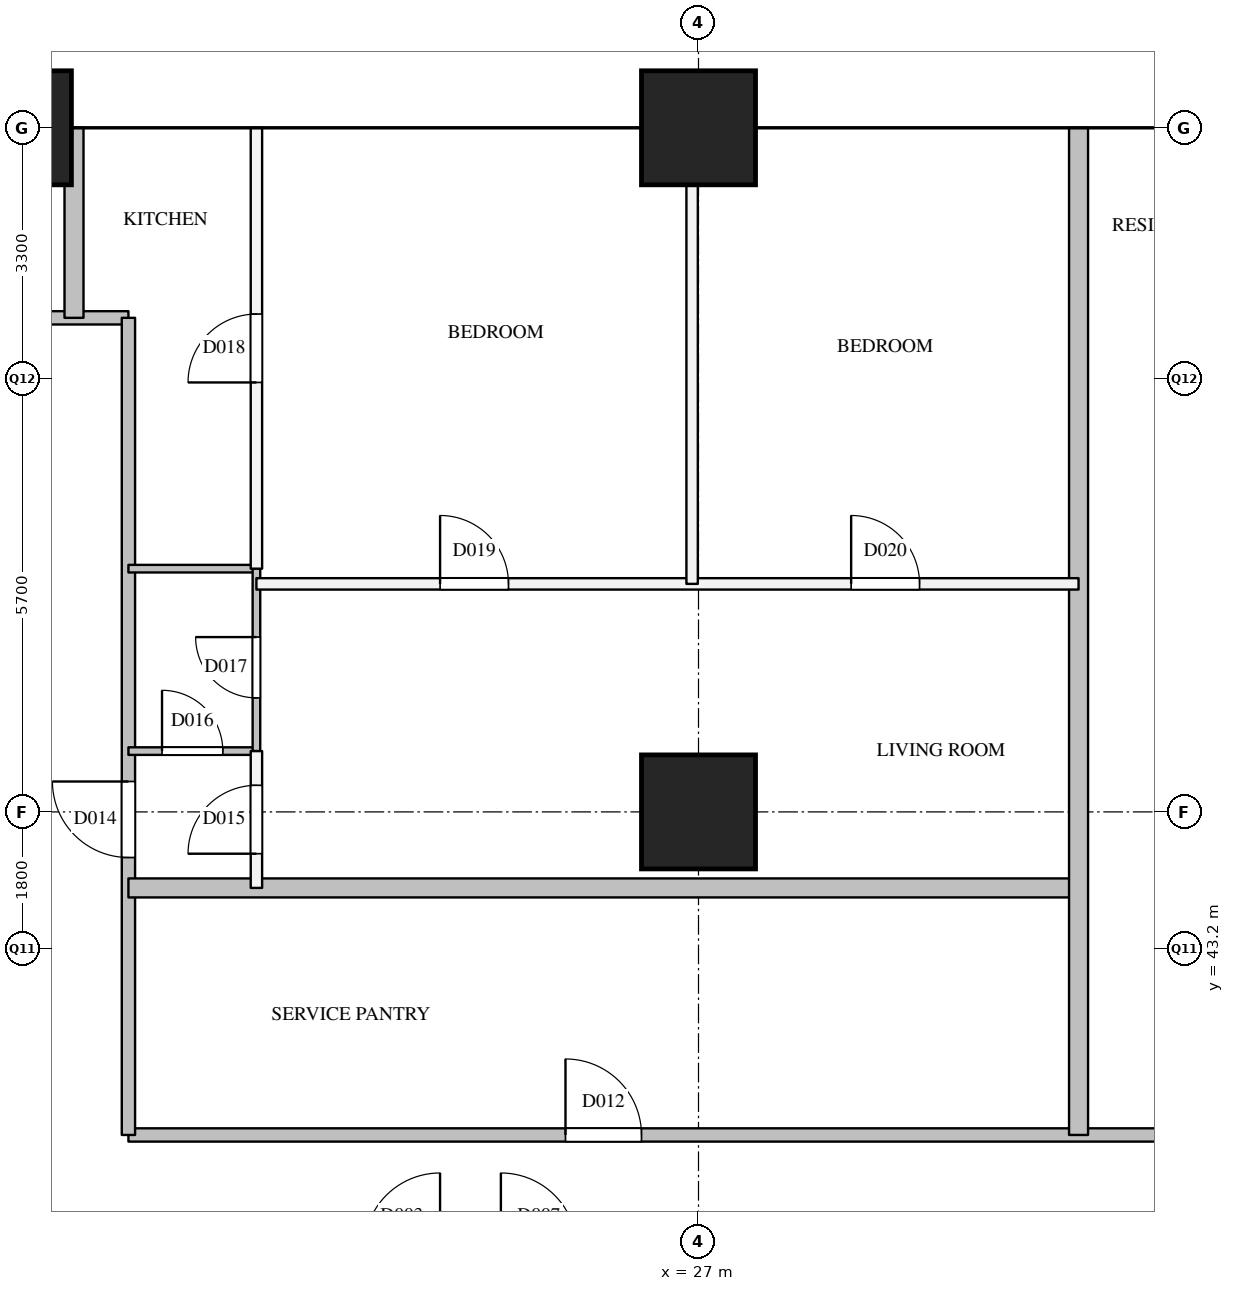
"""IFC4 building model, lengths in metres.
Left out: names, types, materials, properties, quantities, classifications, styles, units other than length and angle.
Written with IfcOpenShell. Run it as: python <this file> out.ifc"""

import sys

from ifc_helpers import new_model, si_unit, direction, frame, frame_2d, origin, origin_2d, place, context, subcontext, project, spatial, rectangle, extrude, element, fill, save


model = new_model("IFC4")
c1 = context("Model", 3, precision=1e-05, world=origin(), true_north=direction((0.0, 1.0)))
c2 = subcontext(c1, "Body", "Model", "MODEL_VIEW")
j1 = project(units=[si_unit("LENGTHUNIT", "METRE"), si_unit("PLANEANGLEUNIT", "RADIAN")], contexts=[c1])
p1 = place(None, origin())
s1 = spatial("IfcSite", under=j1, at=p1, CompositionType="ELEMENT")
p2 = place(p1, origin())
s2 = spatial("IfcBuilding", under=s1, at=p2, CompositionType="ELEMENT")
p3 = place(p2, frame((0.0, 0.0, 173.9)))
s3 = spatial("IfcBuildingStorey", under=s2, at=p3, CompositionType="ELEMENT", Elevation=173.9)
for number, where, z_axis, x_axis in (
    (1, (18.0, 54.0, 0.0), (0.0, 0.0, 1.0), (1.0, 0.0, 0.0)),
    (2, (27.0, 45.0, 0.0), (0.0, 0.0, 1.0), (1.0, 0.0, 0.0)),
    (3, (27.0, 54.0, 0.0), (0.0, 0.0, 1.0), (1.0, 0.0, 0.0)),
):
    element("IfcColumn", number, at=place(p3, frame(where, z_axis=z_axis, x_axis=x_axis)), inside=s3, PredefinedType="COLUMN", context=c2, shape_type="SweptSolid", body=[
        extrude(rectangle(XDim=1.5, YDim=1.5, at=origin_2d()), origin(), (0.0, 0.0, 1.0), 3.9),
    ])
p4 = place(p3, frame((19.5, 40.75, 0.0), z_axis=(0.0, 0.0, 1.0), x_axis=(1.0, 0.0, 0.0)))
e4 = element("IfcWall", 4, at=p4, inside=s3, PredefinedType="PARTITIONING", context=c2, shape_type="SweptSolid", body=[
    extrude(rectangle(XDim=15.0, YDim=0.175, at=frame_2d((7.5, 0.0))), origin(), (0.0, 0.0, 1.0), 2.6),
])
p5 = place(p4, frame((5.75, 0.0, 0.0)))
e5 = element("IfcOpeningElement", 5, at=p5, cuts=e4, PredefinedType="OPENING", context=c2, shape_type="SweptSolid", body=[
    extrude(rectangle(XDim=1.0, YDim=2.1, at=frame_2d((0.5, 1.05))), frame((0.0, 0.097, 0.0), z_axis=(0.0, -1.0, 0.0), x_axis=(1.0, 0.0, 0.0)), (0.0, 0.0, 1.0), 0.195),
])
p6 = place(p3, frame((4.1, 51.5, 0.0), z_axis=(0.0, 0.0, 1.0), x_axis=(1.0, 0.0, 0.0)))
e6 = element("IfcWall", 6, at=p6, inside=s3, PredefinedType="PARTITIONING", context=c2, shape_type="SweptSolid", body=[
    extrude(rectangle(XDim=15.4, YDim=0.175, at=frame_2d((7.7, 0.0))), origin(), (0.0, 0.0, 1.0), 3.6),
])
p7 = place(p6, frame((8.212, 0.0, 0.0)))
e7 = element("IfcOpeningElement", 7, at=p7, cuts=e6, PredefinedType="OPENING", context=c2, shape_type="SweptSolid", body=[
    extrude(rectangle(XDim=1.0, YDim=2.1, at=frame_2d((0.5, 1.05))), frame((0.0, 0.097, 0.0), z_axis=(0.0, -1.0, 0.0), x_axis=(1.0, 0.0, 0.0)), (0.0, 0.0, 1.0), 0.195),
])
p8 = place(p3, frame((19.5, 40.75, 0.0), z_axis=(0.0, 0.0, 1.0), x_axis=(0.0, 1.0, 0.0)))
e8 = element("IfcWall", 8, at=p8, inside=s3, PredefinedType="PARTITIONING", context=c2, shape_type="SweptSolid", body=[
    extrude(rectangle(XDim=10.75, YDim=0.175, at=frame_2d((5.375, 0.0))), origin(), (0.0, 0.0, 1.0), 3.6),
])
p9 = place(p8, frame((3.65, 0.0, 0.0)))
e9 = element("IfcOpeningElement", 9, at=p9, cuts=e8, PredefinedType="OPENING", context=c2, shape_type="SweptSolid", body=[
    extrude(rectangle(XDim=1.0, YDim=2.1, at=frame_2d((0.5, 1.05))), frame((0.0, 0.097, 0.0), z_axis=(0.0, -1.0, 0.0), x_axis=(1.0, 0.0, 0.0)), (0.0, 0.0, 1.0), 0.195),
])
p10 = place(p3, frame((21.184, 48.0, 0.0), z_axis=(0.0, 0.0, 1.0), x_axis=(1.0, 0.0, 0.0)))
e10 = element("IfcWall", 10, at=p10, inside=s3, PredefinedType="PARTITIONING", context=c2, shape_type="SweptSolid", body=[
    extrude(rectangle(XDim=10.816, YDim=0.15, at=frame_2d((5.408, 0.0))), origin(), (0.0, 0.0, 1.0), 2.6),
])
p11 = place(p10, frame((2.416, 0.0, 0.0)))
e11 = element("IfcOpeningElement", 11, at=p11, cuts=e10, PredefinedType="OPENING", context=c2, shape_type="SweptSolid", body=[
    extrude(rectangle(XDim=0.9, YDim=2.1, at=frame_2d((0.45, 1.05))), frame((0.0, 0.085, 0.0), z_axis=(0.0, -1.0, 0.0), x_axis=(1.0, 0.0, 0.0)), (0.0, 0.0, 1.0), 0.17),
])
p12 = place(p10, frame((7.824, 0.0, 0.0)))
e12 = element("IfcOpeningElement", 12, at=p12, cuts=e10, PredefinedType="OPENING", context=c2, shape_type="SweptSolid", body=[
    extrude(rectangle(XDim=0.9, YDim=2.1, at=frame_2d((0.45, 1.05))), frame((0.0, 0.085, 0.0), z_axis=(0.0, -1.0, 0.0), x_axis=(1.0, 0.0, 0.0)), (0.0, 0.0, 1.0), 0.17),
])
p13 = place(p3, frame((21.184, 44.0, 0.0), z_axis=(0.0, 0.0, 1.0), x_axis=(0.0, 1.0, 0.0)))
e13 = element("IfcWall", 13, at=p13, inside=s3, PredefinedType="PARTITIONING", context=c2, shape_type="SweptSolid", body=[
    extrude(rectangle(XDim=1.8, YDim=0.15, at=frame_2d((0.9, 0.0))), origin(), (0.0, 0.0, 1.0), 3.6),
])
p14 = place(p13, frame((0.45, 0.0, 0.0)))
e14 = element("IfcOpeningElement", 14, at=p14, cuts=e13, PredefinedType="OPENING", context=c2, shape_type="SweptSolid", body=[
    extrude(rectangle(XDim=0.9, YDim=2.1, at=frame_2d((0.45, 1.05))), frame((0.0, 0.085, 0.0), z_axis=(0.0, -1.0, 0.0), x_axis=(1.0, 0.0, 0.0)), (0.0, 0.0, 1.0), 0.17),
])
p15 = place(p3, frame((21.184, 48.2, 0.0), z_axis=(0.0, 0.0, 1.0), x_axis=(0.0, 1.0, 0.0)))
e15 = element("IfcWall", 15, at=p15, inside=s3, PredefinedType="PARTITIONING", context=c2, shape_type="SweptSolid", body=[
    extrude(rectangle(XDim=5.8, YDim=0.15, at=frame_2d((2.9, 0.0))), origin(), (0.0, 0.0, 1.0), 2.6),
])
p16 = place(p15, frame((2.45, 0.0, 0.0)))
e16 = element("IfcOpeningElement", 16, at=p16, cuts=e15, PredefinedType="OPENING", context=c2, shape_type="SweptSolid", body=[
    extrude(rectangle(XDim=0.9, YDim=2.1, at=frame_2d((0.45, 1.05))), frame((0.0, 0.085, 0.0), z_axis=(0.0, -1.0, 0.0), x_axis=(1.0, 0.0, 0.0)), (0.0, 0.0, 1.0), 0.17),
])
p17 = place(p3, frame((26.916, 48.0, 0.0), z_axis=(0.0, 0.0, 1.0), x_axis=(0.0, 1.0, 0.0)))
e17 = element("IfcWall", 17, at=p17, inside=s3, PredefinedType="PARTITIONING", context=c2, shape_type="SweptSolid", body=[
    extrude(rectangle(XDim=6.0, YDim=0.15, at=frame_2d((3.0, 0.0))), origin(), (0.0, 0.0, 1.0), 2.6),
])
p18 = place(p3, frame((19.5, 44.0, 0.0), z_axis=(0.0, 0.0, 1.0), x_axis=(1.0, 0.0, 0.0)))
e18 = element("IfcWall", 18, at=p18, inside=s3, PredefinedType="PARTITIONING", context=c2, shape_type="SweptSolid", body=[
    extrude(rectangle(XDim=12.5, YDim=0.25, at=frame_2d((6.25, 0.0))), origin(), (0.0, 0.0, 1.0), 2.6),
])
p19 = place(p3, frame((18.784, 51.5, 0.0), z_axis=(0.0, 0.0, 1.0), x_axis=(0.0, 1.0, 0.0)))
e19 = element("IfcWall", 19, at=p19, inside=s3, PredefinedType="PARTITIONING", context=c2, shape_type="SweptSolid", body=[
    extrude(rectangle(XDim=2.5, YDim=0.25, at=frame_2d((1.25, 0.0))), origin(), (0.0, 0.0, 1.0), 2.6),
])
p20 = place(p3, frame((32.0, 40.75, 0.0), z_axis=(0.0, 0.0, 1.0), x_axis=(0.0, 1.0, 0.0)))
e20 = element("IfcWall", 20, at=p20, inside=s3, PredefinedType="PARTITIONING", context=c2, shape_type="SweptSolid", body=[
    extrude(rectangle(XDim=13.25, YDim=0.25, at=frame_2d((6.625, 0.0))), origin(), (0.0, 0.0, 1.0), 2.6),
])
p21 = place(p3, frame((19.5, 45.8, 0.0), z_axis=(0.0, 0.0, 1.0), x_axis=(1.0, 0.0, 0.0)))
e21 = element("IfcWall", 21, at=p21, inside=s3, PredefinedType="PARTITIONING", context=c2, shape_type="SweptSolid", body=[
    extrude(rectangle(XDim=1.684, YDim=0.1, at=frame_2d((0.842, 0.0))), origin(), (0.0, 0.0, 1.0), 3.6),
])
p22 = place(p21, frame((0.442, 0.0, 0.0)))
e22 = element("IfcOpeningElement", 22, at=p22, cuts=e21, PredefinedType="OPENING", context=c2, shape_type="SweptSolid", body=[
    extrude(rectangle(XDim=0.8, YDim=2.1, at=frame_2d((0.4, 1.05))), frame((0.0, 0.06, 0.0), z_axis=(0.0, -1.0, 0.0), x_axis=(1.0, 0.0, 0.0)), (0.0, 0.0, 1.0), 0.12),
])
p23 = place(p3, frame((19.5, 48.2, 0.0), z_axis=(0.0, 0.0, 1.0), x_axis=(1.0, 0.0, 0.0)))
e23 = element("IfcWall", 23, at=p23, inside=s3, PredefinedType="PARTITIONING", context=c2, shape_type="SweptSolid", body=[
    extrude(rectangle(XDim=1.684, YDim=0.1, at=frame_2d((0.842, 0.0))), origin(), (0.0, 0.0, 1.0), 3.6),
])
p24 = place(p3, frame((21.184, 45.8, 0.0), z_axis=(0.0, 0.0, 1.0), x_axis=(0.0, 1.0, 0.0)))
e24 = element("IfcWall", 24, at=p24, inside=s3, PredefinedType="PARTITIONING", context=c2, shape_type="SweptSolid", body=[
    extrude(rectangle(XDim=2.4, YDim=0.1, at=frame_2d((1.2, 0.0))), origin(), (0.0, 0.0, 1.0), 3.6),
])
p25 = place(p24, frame((0.7, 0.0, 0.0)))
e25 = element("IfcOpeningElement", 25, at=p25, cuts=e24, PredefinedType="OPENING", context=c2, shape_type="SweptSolid", body=[
    extrude(rectangle(XDim=0.8, YDim=2.1, at=frame_2d((0.4, 1.05))), frame((0.0, 0.06, 0.0), z_axis=(0.0, -1.0, 0.0), x_axis=(1.0, 0.0, 0.0)), (0.0, 0.0, 1.0), 0.12),
])
p26 = place(p5, origin())
e26 = element("IfcDoor", 26, at=p26, inside=s3, OperationType="SINGLE_SWING_LEFT", PredefinedType="DOOR", context=c2, shape_type="SweptSolid", body=[
    extrude(rectangle(XDim=1.0, YDim=2.1, at=frame_2d((0.5, 1.05))), frame((0.0, 0.025, 0.0), z_axis=(0.0, -1.0, 0.0), x_axis=(1.0, 0.0, 0.0)), (0.0, 0.0, 1.0), 0.05),
])
fill(e5, e26)
p27 = place(p9, origin())
e27 = element("IfcDoor", 27, at=p27, inside=s3, OperationType="SINGLE_SWING_RIGHT", PredefinedType="DOOR", context=c2, shape_type="SweptSolid", body=[
    extrude(rectangle(XDim=1.0, YDim=2.1, at=frame_2d((0.5, 1.05))), frame((0.0, 0.025, 0.0), z_axis=(0.0, -1.0, 0.0), x_axis=(1.0, 0.0, 0.0)), (0.0, 0.0, 1.0), 0.05),
])
fill(e9, e27)
p28 = place(p14, origin())
e28 = element("IfcDoor", 28, at=p28, inside=s3, OperationType="SINGLE_SWING_LEFT", PredefinedType="DOOR", context=c2, shape_type="SweptSolid", body=[
    extrude(rectangle(XDim=0.9, YDim=2.1, at=frame_2d((0.45, 1.05))), frame((0.0, 0.025, 0.0), z_axis=(0.0, -1.0, 0.0), x_axis=(1.0, 0.0, 0.0)), (0.0, 0.0, 1.0), 0.05),
])
fill(e14, e28)
p29 = place(p22, origin())
e29 = element("IfcDoor", 29, at=p29, inside=s3, OperationType="SINGLE_SWING_LEFT", PredefinedType="DOOR", context=c2, shape_type="SweptSolid", body=[
    extrude(rectangle(XDim=0.8, YDim=2.1, at=frame_2d((0.4, 1.05))), frame((0.0, 0.025, 0.0), z_axis=(0.0, -1.0, 0.0), x_axis=(1.0, 0.0, 0.0)), (0.0, 0.0, 1.0), 0.05),
])
fill(e22, e29)
p30 = place(p25, origin())
e30 = element("IfcDoor", 30, at=p30, inside=s3, OperationType="SINGLE_SWING_RIGHT", PredefinedType="DOOR", context=c2, shape_type="SweptSolid", body=[
    extrude(rectangle(XDim=0.8, YDim=2.1, at=frame_2d((0.4, 1.05))), frame((0.0, 0.025, 0.0), z_axis=(0.0, -1.0, 0.0), x_axis=(1.0, 0.0, 0.0)), (0.0, 0.0, 1.0), 0.05),
])
fill(e25, e30)
p31 = place(p16, origin())
e31 = element("IfcDoor", 31, at=p31, inside=s3, OperationType="SINGLE_SWING_LEFT", PredefinedType="DOOR", context=c2, shape_type="SweptSolid", body=[
    extrude(rectangle(XDim=0.9, YDim=2.1, at=frame_2d((0.45, 1.05))), frame((0.0, 0.025, 0.0), z_axis=(0.0, -1.0, 0.0), x_axis=(1.0, 0.0, 0.0)), (0.0, 0.0, 1.0), 0.05),
])
fill(e16, e31)
p32 = place(p11, origin())
e32 = element("IfcDoor", 32, at=p32, inside=s3, OperationType="SINGLE_SWING_LEFT", PredefinedType="DOOR", context=c2, shape_type="SweptSolid", body=[
    extrude(rectangle(XDim=0.9, YDim=2.1, at=frame_2d((0.45, 1.05))), frame((0.0, 0.025, 0.0), z_axis=(0.0, -1.0, 0.0), x_axis=(1.0, 0.0, 0.0)), (0.0, 0.0, 1.0), 0.05),
])
fill(e11, e32)
p33 = place(p12, origin())
e33 = element("IfcDoor", 33, at=p33, inside=s3, OperationType="SINGLE_SWING_LEFT", PredefinedType="DOOR", context=c2, shape_type="SweptSolid", body=[
    extrude(rectangle(XDim=0.9, YDim=2.1, at=frame_2d((0.45, 1.05))), frame((0.0, 0.025, 0.0), z_axis=(0.0, -1.0, 0.0), x_axis=(1.0, 0.0, 0.0)), (0.0, 0.0, 1.0), 0.05),
])
fill(e12, e33)
save(model, sys.argv[1])
